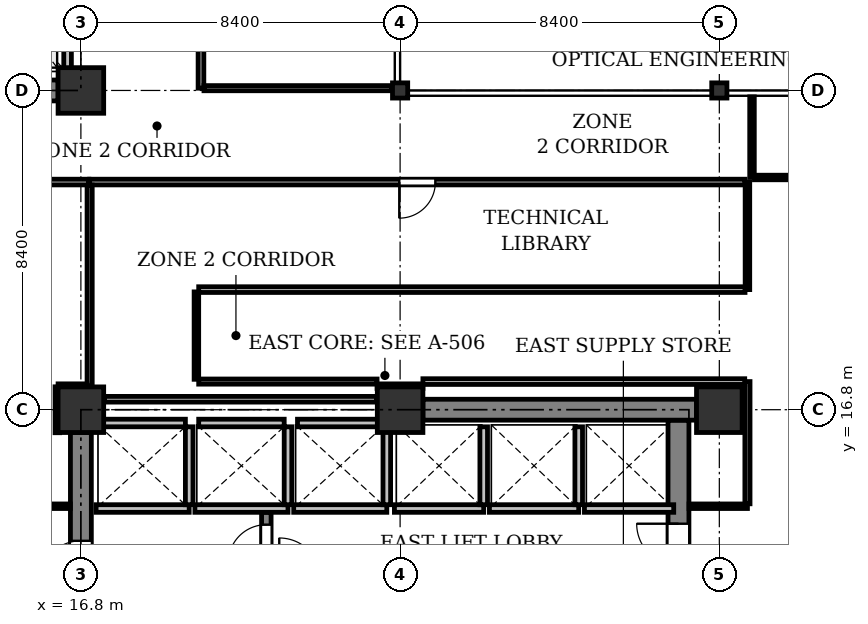
"""IFC4 building model, lengths in metres.
Left out: names, types, materials, properties, quantities, classifications, styles, units other than length and angle.
Written with IfcOpenShell. Run it as: python <this file> out.ifc"""

import sys

from ifc_helpers import new_model, si_unit, direction, frame, frame_2d, origin, origin_2d, place, context, subcontext, project, spatial, rectangle, i_section, extrude, element, fill, save


model = new_model("IFC4")
c1 = context("Model", 3, precision=1e-05, world=origin(), true_north=direction((0.0, 1.0)))
c2 = subcontext(c1, "Body", "Model", "MODEL_VIEW")
j1 = project(units=[si_unit("LENGTHUNIT", "METRE"), si_unit("PLANEANGLEUNIT", "RADIAN")], contexts=[c1])
p1 = place(None, origin())
s1 = spatial("IfcSite", under=j1, at=p1, CompositionType="ELEMENT")
p2 = place(p1, origin())
s2 = spatial("IfcBuilding", under=s1, at=p2, CompositionType="ELEMENT")
p3 = place(p2, frame((0.0, 0.0, 84.4)))
s3 = spatial("IfcBuildingStorey", under=s2, at=p3, CompositionType="ELEMENT", Elevation=84.4)
for number, where, z_axis, x_axis in (
    (1, (16.8, 16.8, 0.0), (0.0, 0.0, 1.0), (1.0, 0.0, 0.0)),
    (2, (16.8, 25.2, 0.0), (0.0, 0.0, 1.0), (1.0, 0.0, 0.0)),
    (3, (25.2, 16.8, 0.0), (0.0, 0.0, 1.0), (1.0, 0.0, 0.0)),
):
    element("IfcColumn", number, at=place(p3, frame(where, z_axis=z_axis, x_axis=x_axis)), inside=s3, PredefinedType="COLUMN", context=c2, shape_type="SweptSolid", body=[
        extrude(rectangle(XDim=1.2, YDim=1.2, at=origin_2d()), origin(), (0.0, 0.0, 1.0), 4.1),
    ])
p4 = place(p3, frame((25.2, 25.2, 0.0), z_axis=(0.0, 0.0, 1.0), x_axis=(1.0, 0.0, 0.0)))
e4 = element("IfcColumn", 4, at=p4, inside=s3, PredefinedType="COLUMN", context=c2, shape_type="SweptSolid", body=[
    extrude(i_section(OverallWidth=0.4, OverallDepth=0.4, WebThickness=0.025, FlangeThickness=0.04, at=origin_2d()), origin(), (0.0, 0.0, 1.0), 4.1),
])
p5 = place(p3, frame((33.6, 16.8, 0.0), z_axis=(0.0, 0.0, 1.0), x_axis=(1.0, 0.0, 0.0)))
e5 = element("IfcColumn", 5, at=p5, inside=s3, PredefinedType="COLUMN", context=c2, shape_type="SweptSolid", body=[
    extrude(rectangle(XDim=1.2, YDim=1.2, at=origin_2d()), origin(), (0.0, 0.0, 1.0), 4.1),
])
p6 = place(p3, frame((33.6, 25.2, 0.0), z_axis=(0.0, 0.0, 1.0), x_axis=(1.0, 0.0, 0.0)))
e6 = element("IfcColumn", 6, at=p6, inside=s3, PredefinedType="COLUMN", context=c2, shape_type="SweptSolid", body=[
    extrude(i_section(OverallWidth=0.4, OverallDepth=0.4, WebThickness=0.025, FlangeThickness=0.04, at=origin_2d()), origin(), (0.0, 0.0, 1.0), 4.1),
])
p7 = place(p3, frame((9.0, 25.2, 0.0), z_axis=(0.0, 0.0, 1.0), x_axis=(1.0, 0.0, 0.0)))
e7 = element("IfcWall", 7, at=p7, inside=s3, PredefinedType="SHEAR", context=c2, shape_type="SweptSolid", body=[
    extrude(rectangle(XDim=7.2, YDim=0.55, at=frame_2d((3.6, 0.0))), origin(), (0.0, 0.0, 1.0), 3.825),
])
p8 = place(p7, frame((3.7, 0.0, 0.0)))
e8 = element("IfcOpeningElement", 8, at=p8, cuts=e7, PredefinedType="OPENING", context=c2, shape_type="SweptSolid", body=[
    extrude(rectangle(XDim=1.1, YDim=2.15, at=frame_2d((0.55, 1.075))), frame((0.0, 0.285, 0.0), z_axis=(0.0, -1.0, 0.0), x_axis=(1.0, 0.0, 0.0)), (0.0, 0.0, 1.0), 0.57),
])
p9 = place(p3, frame((32.525, 8.675, 0.0), z_axis=(0.0, 0.0, 1.0), x_axis=(0.0, 1.0, 0.0)))
e9 = element("IfcWall", 9, at=p9, inside=s3, PredefinedType="SHEAR", context=c2, shape_type="SweptSolid", body=[
    extrude(rectangle(XDim=7.85, YDim=0.55, at=frame_2d((3.925, 0.0))), origin(), (0.0, 0.0, 1.0), 3.825),
])
p10 = place(p9, frame((4.025, 0.0, 0.0)))
e10 = element("IfcOpeningElement", 10, at=p10, cuts=e9, PredefinedType="OPENING", context=c2, shape_type="SweptSolid", body=[
    extrude(rectangle(XDim=1.1, YDim=2.15, at=frame_2d((0.55, 1.075))), frame((0.0, 0.285, 0.0), z_axis=(0.0, -1.0, 0.0), x_axis=(1.0, 0.0, 0.0)), (0.0, 0.0, 1.0), 0.57),
])
p11 = place(p3, frame((16.8, 9.0, 0.0), z_axis=(0.0, 0.0, 1.0), x_axis=(0.0, 1.0, 0.0)))
e11 = element("IfcWall", 11, at=p11, inside=s3, PredefinedType="SHEAR", context=c2, shape_type="SweptSolid", body=[
    extrude(rectangle(XDim=7.2, YDim=0.55, at=frame_2d((3.6, 0.0))), origin(), (0.0, 0.0, 1.0), 3.825),
])
p12 = place(p11, frame((3.25, 0.0, 0.0)))
e12 = element("IfcOpeningElement", 12, at=p12, cuts=e11, PredefinedType="OPENING", context=c2, shape_type="SweptSolid", body=[
    extrude(rectangle(XDim=1.1, YDim=2.15, at=frame_2d((0.55, 1.075))), frame((0.0, 0.285, 0.0), z_axis=(0.0, -1.0, 0.0), x_axis=(1.0, 0.0, 0.0)), (0.0, 0.0, 1.0), 0.57),
])
p13 = place(p3, frame((25.8, 16.8, 0.0), z_axis=(0.0, 0.0, 1.0), x_axis=(1.0, 0.0, 0.0)))
e13 = element("IfcWall", 13, at=p13, inside=s3, PredefinedType="SHEAR", context=c2, shape_type="SweptSolid", body=[
    extrude(rectangle(XDim=7.2, YDim=0.55, at=frame_2d((3.6, 0.0))), origin(), (0.0, 0.0, 1.0), 3.825),
])
p14 = place(p3, frame((21.68, 12.45, 0.0), z_axis=(0.0, 0.0, 1.0), x_axis=(0.0, 1.0, 0.0)))
e14 = element("IfcWall", 14, at=p14, inside=s3, PredefinedType="SHEAR", context=c2, shape_type="SweptSolid", body=[
    extrude(rectangle(XDim=1.65, YDim=0.25, at=frame_2d((0.825, 0.0))), origin(), (0.0, 0.0, 1.0), 3.825),
])
p15 = place(p14, frame((0.325, 0.0, 0.0)))
e15 = element("IfcOpeningElement", 15, at=p15, cuts=e14, PredefinedType="OPENING", context=c2, shape_type="SweptSolid", body=[
    extrude(rectangle(XDim=1.0, YDim=2.15, at=frame_2d((0.5, 1.075))), frame((0.0, 0.135, 0.0), z_axis=(0.0, -1.0, 0.0), x_axis=(1.0, 0.0, 0.0)), (0.0, 0.0, 1.0), 0.27),
])
p16 = place(p3, frame((16.45, 25.75, 0.0), z_axis=(0.0, 0.0, 1.0), x_axis=(0.0, 1.0, 0.0)))
e16 = element("IfcWall", 16, at=p16, inside=s3, PredefinedType="PARTITIONING", context=c2, shape_type="SweptSolid", body=[
    extrude(rectangle(XDim=2.3, YDim=0.2, at=frame_2d((1.15, 0.0))), origin(), (0.0, 0.0, 1.0), 3.825),
])
p17 = place(p3, frame((17.2, 14.2, 0.0), z_axis=(0.0, 0.0, 1.0), x_axis=(1.0, 0.0, 0.0)))
e17 = element("IfcWall", 17, at=p17, inside=s3, PredefinedType="PARTITIONING", context=c2, shape_type="SweptSolid", body=[
    extrude(rectangle(XDim=2.45, YDim=0.2, at=frame_2d((1.225, 0.0))), origin(), (0.0, 0.0, 1.0), 3.825),
])
p18 = place(p3, frame((19.65, 14.3, 0.0), z_axis=(0.0, 0.0, 1.0), x_axis=(0.0, 1.0, 0.0)))
e18 = element("IfcWall", 18, at=p18, inside=s3, PredefinedType="PARTITIONING", context=c2, shape_type="SweptSolid", body=[
    extrude(rectangle(XDim=2.05, YDim=0.2, at=frame_2d((1.025, 0.0))), origin(), (0.0, 0.0, 1.0), 3.825),
])
p19 = place(p3, frame((17.3, 16.45, 0.0), z_axis=(0.0, 0.0, 1.0), x_axis=(1.0, 0.0, 0.0)))
e19 = element("IfcWall", 19, at=p19, inside=s3, PredefinedType="PARTITIONING", context=c2, shape_type="SweptSolid", body=[
    extrude(rectangle(XDim=2.25, YDim=0.2, at=frame_2d((1.125, 0.0))), origin(), (0.0, 0.0, 1.0), 3.825),
])
p20 = place(p3, frame((19.8, 14.2, 0.0), z_axis=(0.0, 0.0, 1.0), x_axis=(1.0, 0.0, 0.0)))
e20 = element("IfcWall", 20, at=p20, inside=s3, PredefinedType="PARTITIONING", context=c2, shape_type="SweptSolid", body=[
    extrude(rectangle(XDim=2.45, YDim=0.2, at=frame_2d((1.225, 0.0))), origin(), (0.0, 0.0, 1.0), 3.825),
])
p21 = place(p3, frame((22.25, 14.3, 0.0), z_axis=(0.0, 0.0, 1.0), x_axis=(0.0, 1.0, 0.0)))
e21 = element("IfcWall", 21, at=p21, inside=s3, PredefinedType="PARTITIONING", context=c2, shape_type="SweptSolid", body=[
    extrude(rectangle(XDim=2.05, YDim=0.2, at=frame_2d((1.025, 0.0))), origin(), (0.0, 0.0, 1.0), 3.825),
])
p22 = place(p3, frame((19.9, 16.45, 0.0), z_axis=(0.0, 0.0, 1.0), x_axis=(1.0, 0.0, 0.0)))
e22 = element("IfcWall", 22, at=p22, inside=s3, PredefinedType="PARTITIONING", context=c2, shape_type="SweptSolid", body=[
    extrude(rectangle(XDim=2.25, YDim=0.2, at=frame_2d((1.125, 0.0))), origin(), (0.0, 0.0, 1.0), 3.825),
])
p23 = place(p3, frame((22.4, 14.2, 0.0), z_axis=(0.0, 0.0, 1.0), x_axis=(1.0, 0.0, 0.0)))
e23 = element("IfcWall", 23, at=p23, inside=s3, PredefinedType="PARTITIONING", context=c2, shape_type="SweptSolid", body=[
    extrude(rectangle(XDim=2.45, YDim=0.2, at=frame_2d((1.225, 0.0))), origin(), (0.0, 0.0, 1.0), 3.825),
])
p24 = place(p3, frame((24.85, 14.3, 0.0), z_axis=(0.0, 0.0, 1.0), x_axis=(0.0, 1.0, 0.0)))
e24 = element("IfcWall", 24, at=p24, inside=s3, PredefinedType="PARTITIONING", context=c2, shape_type="SweptSolid", body=[
    extrude(rectangle(XDim=2.05, YDim=0.2, at=frame_2d((1.025, 0.0))), origin(), (0.0, 0.0, 1.0), 3.825),
])
p25 = place(p3, frame((22.5, 16.45, 0.0), z_axis=(0.0, 0.0, 1.0), x_axis=(1.0, 0.0, 0.0)))
e25 = element("IfcWall", 25, at=p25, inside=s3, PredefinedType="PARTITIONING", context=c2, shape_type="SweptSolid", body=[
    extrude(rectangle(XDim=2.25, YDim=0.2, at=frame_2d((1.125, 0.0))), origin(), (0.0, 0.0, 1.0), 3.825),
])
p26 = place(p3, frame((25.05, 14.2, 0.0), z_axis=(0.0, 0.0, 1.0), x_axis=(1.0, 0.0, 0.0)))
e26 = element("IfcWall", 26, at=p26, inside=s3, PredefinedType="PARTITIONING", context=c2, shape_type="SweptSolid", body=[
    extrude(rectangle(XDim=2.35, YDim=0.2, at=frame_2d((1.175, 0.0))), origin(), (0.0, 0.0, 1.0), 3.825),
])
p27 = place(p3, frame((27.4, 14.3, 0.0), z_axis=(0.0, 0.0, 1.0), x_axis=(0.0, 1.0, 0.0)))
e27 = element("IfcWall", 27, at=p27, inside=s3, PredefinedType="PARTITIONING", context=c2, shape_type="SweptSolid", body=[
    extrude(rectangle(XDim=2.05, YDim=0.2, at=frame_2d((1.025, 0.0))), origin(), (0.0, 0.0, 1.0), 3.825),
])
p28 = place(p3, frame((27.55, 14.2, 0.0), z_axis=(0.0, 0.0, 1.0), x_axis=(1.0, 0.0, 0.0)))
e28 = element("IfcWall", 28, at=p28, inside=s3, PredefinedType="PARTITIONING", context=c2, shape_type="SweptSolid", body=[
    extrude(rectangle(XDim=2.35, YDim=0.2, at=frame_2d((1.175, 0.0))), origin(), (0.0, 0.0, 1.0), 3.825),
])
p29 = place(p3, frame((29.9, 14.3, 0.0), z_axis=(0.0, 0.0, 1.0), x_axis=(0.0, 1.0, 0.0)))
e29 = element("IfcWall", 29, at=p29, inside=s3, PredefinedType="PARTITIONING", context=c2, shape_type="SweptSolid", body=[
    extrude(rectangle(XDim=2.05, YDim=0.2, at=frame_2d((1.025, 0.0))), origin(), (0.0, 0.0, 1.0), 3.825),
])
p30 = place(p3, frame((30.05, 14.2, 0.0), z_axis=(0.0, 0.0, 1.0), x_axis=(1.0, 0.0, 0.0)))
e30 = element("IfcWall", 30, at=p30, inside=s3, PredefinedType="PARTITIONING", context=c2, shape_type="SweptSolid", body=[
    extrude(rectangle(XDim=2.35, YDim=0.2, at=frame_2d((1.175, 0.0))), origin(), (0.0, 0.0, 1.0), 3.825),
])
p31 = place(p3, frame((34.34, 19.96, 0.0), z_axis=(0.0, 0.0, 1.0), x_axis=(0.0, 1.0, 0.0)))
e31 = element("IfcWall", 31, at=p31, inside=s3, PredefinedType="PARTITIONING", context=c2, shape_type="SweptSolid", body=[
    extrude(rectangle(XDim=2.83, YDim=0.12, at=frame_2d((1.415, 0.0))), origin(), (0.0, 0.0, 1.0), 3.825),
])
p32 = place(p3, frame((34.276, 22.79, 0.0), z_axis=(0.0, 0.0, 1.0), x_axis=(-1.0, 0.0, 0.0)))
e32 = element("IfcWall", 32, at=p32, inside=s3, PredefinedType="PARTITIONING", context=c2, shape_type="SweptSolid", body=[
    extrude(rectangle(XDim=17.245, YDim=0.15, at=frame_2d((8.623, 0.0))), origin(), (0.0, 0.0, 1.0), 3.297),
])
p33 = place(p32, frame((8.148, 0.0, 0.0)))
e33 = element("IfcOpeningElement", 33, at=p33, cuts=e32, PredefinedType="OPENING", context=c2, shape_type="SweptSolid", body=[
    extrude(rectangle(XDim=0.95, YDim=2.15, at=frame_2d((0.475, 1.075))), frame((0.0, 0.085, 0.0), z_axis=(0.0, -1.0, 0.0), x_axis=(1.0, 0.0, 0.0)), (0.0, 0.0, 1.0), 0.17),
])
p34 = place(p3, frame((17.031, 22.711, 0.0), z_axis=(0.0, 0.0, 1.0), x_axis=(0.0, -1.0, 0.0)))
e34 = element("IfcWall", 34, at=p34, inside=s3, PredefinedType="PARTITIONING", context=c2, shape_type="SweptSolid", body=[
    extrude(rectangle(XDim=5.291, YDim=0.135, at=frame_2d((2.646, 0.0))), origin(), (0.0, 0.0, 1.0), 3.825),
])
p35 = place(p3, frame((17.42, 17.075, 0.0), z_axis=(0.0, 0.0, 1.0), x_axis=(1.0, 0.0, 0.0)))
e35 = element("IfcWall", 35, at=p35, inside=s3, PredefinedType="PARTITIONING", context=c2, shape_type="SweptSolid", body=[
    extrude(rectangle(XDim=7.16, YDim=0.15, at=frame_2d((3.58, 0.0))), origin(), (0.0, 0.0, 1.0), 3.469),
])
p36 = place(p3, frame((24.594, 17.419, 0.0), z_axis=(0.0, 0.0, 1.0), x_axis=(0.999999815526, 0.000607410295, 0.0)))
e36 = element("IfcWall", 36, at=p36, inside=s3, PredefinedType="PARTITIONING", context=c2, shape_type="SweptSolid", body=[
    extrude(rectangle(XDim=1.206, YDim=0.12, at=frame_2d((0.603, 0.0))), origin(), (0.0, 0.0, 1.0), 3.297),
])
p37 = place(p3, frame((32.804, 14.26, 0.0), z_axis=(0.0, 0.0, 1.0), x_axis=(1.0, 0.0, 0.0)))
e37 = element("IfcWall", 37, at=p37, inside=s3, PredefinedType="PARTITIONING", context=c2, shape_type="SweptSolid", body=[
    extrude(rectangle(XDim=1.536, YDim=0.12, at=frame_2d((0.768, 0.0))), origin(), (0.0, 0.0, 1.0), 3.297),
])
p38 = place(p3, frame((34.34, 14.324, 0.0), z_axis=(0.0, 0.0, 1.0), x_axis=(0.0, 1.0, 0.0)))
e38 = element("IfcWall", 38, at=p38, inside=s3, PredefinedType="PARTITIONING", context=c2, shape_type="SweptSolid", body=[
    extrude(rectangle(XDim=3.216, YDim=0.135, at=frame_2d((1.608, 0.0))), origin(), (0.0, 0.0, 1.0), 3.292),
])
p39 = place(p3, frame((34.269, 17.54, 0.0), z_axis=(0.0, 0.0, 1.0), x_axis=(-1.0, 0.0, 0.0)))
e39 = element("IfcWall", 39, at=p39, inside=s3, PredefinedType="PARTITIONING", context=c2, shape_type="SweptSolid", body=[
    extrude(rectangle(XDim=8.469, YDim=0.15, at=frame_2d((4.234, 0.0))), origin(), (0.0, 0.0, 1.0), 3.297),
])
p40 = place(p3, frame((24.594, 17.54, 0.0), z_axis=(0.0, 0.0, 1.0), x_axis=(-1.0, 0.0, 0.0)))
e40 = element("IfcWall", 40, at=p40, inside=s3, PredefinedType="PARTITIONING", context=c2, shape_type="SweptSolid", body=[
    extrude(rectangle(XDim=4.694, YDim=0.135, at=frame_2d((2.347, 0.0))), origin(), (0.0, 0.0, 1.0), 3.469),
])
p41 = place(p3, frame((19.84, 17.6, 0.0), z_axis=(0.0, 0.0, 1.0), x_axis=(0.0, 1.0, 0.0)))
e41 = element("IfcWall", 41, at=p41, inside=s3, PredefinedType="PARTITIONING", context=c2, shape_type="SweptSolid", body=[
    extrude(rectangle(XDim=2.3, YDim=0.12, at=frame_2d((1.15, 0.0))), origin(), (0.0, 0.0, 1.0), 3.825),
])
p42 = place(p3, frame((19.9, 19.96, 0.0), z_axis=(0.0, 0.0, 1.0), x_axis=(1.0, 0.0, 0.0)))
e42 = element("IfcWall", 42, at=p42, inside=s3, PredefinedType="PARTITIONING", context=c2, shape_type="SweptSolid", body=[
    extrude(rectangle(XDim=14.376, YDim=0.15, at=frame_2d((7.188, 0.0))), origin(), (0.0, 0.0, 1.0), 3.297),
])
p43 = place(p3, frame((14.4, 14.26, 0.0), z_axis=(0.0, 0.0, 1.0), x_axis=(1.0, 0.0, 0.0)))
e43 = element("IfcWall", 43, at=p43, inside=s3, PredefinedType="PARTITIONING", context=c2, shape_type="SweptSolid", body=[
    extrude(rectangle(XDim=2.121, YDim=0.12, at=frame_2d((1.061, 0.0))), origin(), (0.0, 0.0, 1.0), 3.825),
])
p44 = place(p3, frame((16.181, 16.194, 0.0), z_axis=(0.0, 0.0, 1.0), x_axis=(-0.000606305467, 0.999999816197, 0.0)))
e44 = element("IfcWall", 44, at=p44, inside=s3, PredefinedType="PARTITIONING", context=c2, shape_type="SweptSolid", body=[
    extrude(rectangle(XDim=1.208, YDim=0.12, at=frame_2d((0.604, 0.0))), origin(), (0.0, 0.0, 1.0), 3.292),
])
p45 = place(p3, frame((16.2, 17.42, 0.0), z_axis=(0.0, 0.0, 1.0), x_axis=(1.0, 0.0, 0.0)))
e45 = element("IfcWall", 45, at=p45, inside=s3, PredefinedType="PARTITIONING", context=c2, shape_type="SweptSolid", body=[
    extrude(rectangle(XDim=0.759, YDim=0.12, at=frame_2d((0.379, 0.0))), origin(), (0.0, 0.0, 1.0), 3.297),
])
p46 = place(p3, frame((17.01, 22.79, 0.0), z_axis=(0.0, 0.0, 1.0), x_axis=(-1.0, 0.0, 0.0)))
e46 = element("IfcWall", 46, at=p46, inside=s3, PredefinedType="PARTITIONING", context=c2, shape_type="SweptSolid", body=[
    extrude(rectangle(XDim=9.301, YDim=0.15, at=frame_2d((4.65, 0.0))), origin(), (0.0, 0.0, 1.0), 3.297),
])
p47 = place(p3, frame((34.46, 25.031, 0.0), z_axis=(0.0, 0.0, 1.0), x_axis=(0.0, -1.0, 0.0)))
e47 = element("IfcWall", 47, at=p47, inside=s3, PredefinedType="PARTITIONING", context=c2, shape_type="SweptSolid", body=[
    extrude(rectangle(XDim=2.121, YDim=0.12, at=frame_2d((1.061, 0.0))), origin(), (0.0, 0.0, 1.0), 3.825),
])
p48 = place(p3, frame((34.524, 22.91, 0.0), z_axis=(0.0, 0.0, 1.0), x_axis=(1.0, 0.0, 0.0)))
e48 = element("IfcWall", 48, at=p48, inside=s3, PredefinedType="PARTITIONING", context=c2, shape_type="SweptSolid", body=[
    extrude(rectangle(XDim=2.126, YDim=0.12, at=frame_2d((1.063, 0.0))), origin(), (0.0, 0.0, 1.0), 3.825),
])
p49 = place(p3, frame((19.96, 45.2, 0.0), z_axis=(0.0, 0.0, 1.0), x_axis=(0.0, -1.0, 0.0)))
e49 = element("IfcWall", 49, at=p49, inside=s3, PredefinedType="PARTITIONING", context=c2, shape_type="SweptSolid", body=[
    extrude(rectangle(XDim=19.94, YDim=0.15, at=frame_2d((9.97, 0.0))), origin(), (0.0, 0.0, 1.0), 3.292),
])
p50 = place(p3, frame((20.039, 25.26, 0.0), z_axis=(0.0, 0.0, 1.0), x_axis=(1.0, 0.0, 0.0)))
e50 = element("IfcWall", 50, at=p50, inside=s3, PredefinedType="PARTITIONING", context=c2, shape_type="SweptSolid", body=[
    extrude(rectangle(XDim=4.941, YDim=0.135, at=frame_2d((2.47, 0.0))), origin(), (0.0, 0.0, 1.0), 3.292),
])
p51 = place(p10, origin())
e51 = element("IfcDoor", 51, at=p51, inside=s3, OperationType="SINGLE_SWING_RIGHT", PredefinedType="DOOR", context=c2, shape_type="SweptSolid", body=[
    extrude(rectangle(XDim=1.1, YDim=2.15, at=frame_2d((0.55, 1.075))), frame((0.0, 0.025, 0.0), z_axis=(0.0, -1.0, 0.0), x_axis=(1.0, 0.0, 0.0)), (0.0, 0.0, 1.0), 0.05),
])
fill(e10, e51)
p52 = place(p12, origin())
e52 = element("IfcDoor", 52, at=p52, inside=s3, OperationType="SINGLE_SWING_LEFT", PredefinedType="DOOR", context=c2, shape_type="SweptSolid", body=[
    extrude(rectangle(XDim=1.1, YDim=2.15, at=frame_2d((0.55, 1.075))), frame((0.0, 0.025, 0.0), z_axis=(0.0, -1.0, 0.0), x_axis=(1.0, 0.0, 0.0)), (0.0, 0.0, 1.0), 0.05),
])
fill(e12, e52)
p53 = place(p15, origin())
e53 = element("IfcDoor", 53, at=p53, inside=s3, OperationType="SINGLE_SWING_LEFT", PredefinedType="DOOR", context=c2, shape_type="SweptSolid", body=[
    extrude(rectangle(XDim=1.0, YDim=2.15, at=frame_2d((0.5, 1.075))), frame((0.0, 0.025, 0.0), z_axis=(0.0, -1.0, 0.0), x_axis=(1.0, 0.0, 0.0)), (0.0, 0.0, 1.0), 0.05),
])
fill(e15, e53)
p54 = place(p33, origin())
e54 = element("IfcDoor", 54, at=p54, inside=s3, OperationType="SINGLE_SWING_RIGHT", PredefinedType="DOOR", context=c2, shape_type="SweptSolid", body=[
    extrude(rectangle(XDim=0.95, YDim=2.15, at=frame_2d((0.475, 1.075))), frame((0.0, 0.025, 0.0), z_axis=(0.0, -1.0, 0.0), x_axis=(1.0, 0.0, 0.0)), (0.0, 0.0, 1.0), 0.05),
])
fill(e33, e54)
save(model, sys.argv[1])
